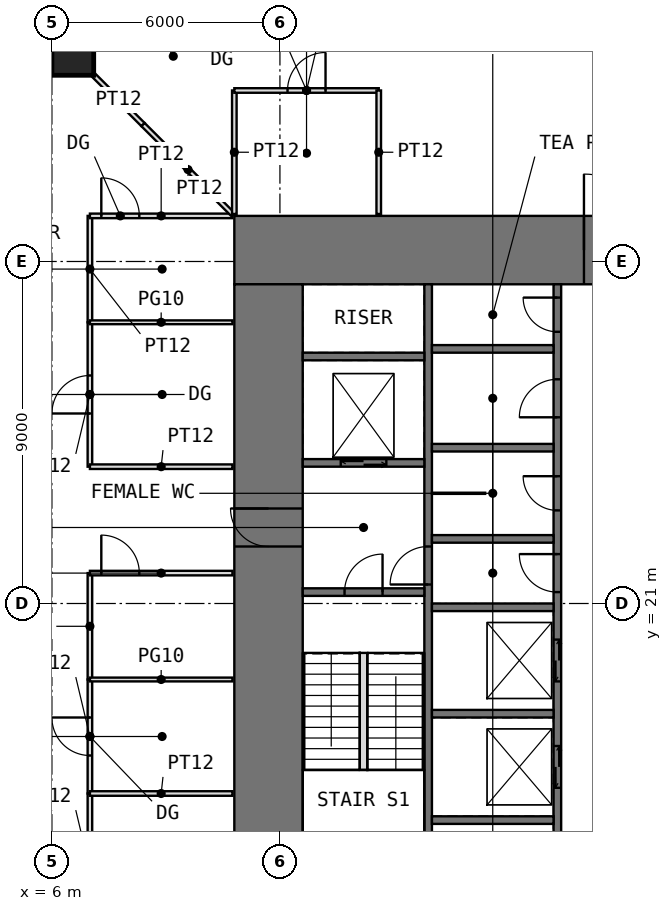
"""IFC4 building model, lengths in metres.
Left out: names, types, materials, properties, quantities, classifications, styles, units other than length and angle.
Written with IfcOpenShell. Run it as: python <this file> out.ifc"""

import sys

from ifc_helpers import new_model, si_unit, direction, frame, frame_2d, origin, origin_2d, place, context, subcontext, project, spatial, rectangle, extrude, element, fill, save


model = new_model("IFC4")
c1 = context("Model", 3, precision=1e-05, world=origin(), true_north=direction((0.0, 1.0)))
c2 = subcontext(c1, "Body", "Model", "MODEL_VIEW")
j1 = project(units=[si_unit("LENGTHUNIT", "METRE"), si_unit("PLANEANGLEUNIT", "RADIAN")], contexts=[c1])
p1 = place(None, origin())
s1 = spatial("IfcSite", under=j1, at=p1, CompositionType="ELEMENT")
p2 = place(p1, origin())
s2 = spatial("IfcBuilding", under=s1, at=p2, CompositionType="ELEMENT")
p3 = place(p2, frame((0.0, 0.0, 74.5)))
s3 = spatial("IfcBuildingStorey", under=s2, at=p3, CompositionType="ELEMENT", Elevation=74.5)
p4 = place(p3, frame((6.55, 35.45, 0.0), z_axis=(0.0, 0.0, 1.0), x_axis=(1.0, 0.0, 0.0)))
e1 = element("IfcColumn", 1, at=p4, inside=s3, PredefinedType="COLUMN", context=c2, shape_type="SweptSolid", body=[
    extrude(rectangle(XDim=1.1, YDim=1.1, at=origin_2d()), origin(), (0.0, 0.0, 1.0), 4.0),
])
p5 = place(p3, frame((10.8, 30.3, -0.05), z_axis=(0.0, 0.0, 1.0), x_axis=(1.0, 0.0, 0.0)))
e2 = element("IfcWall", 2, at=p5, inside=s3, PredefinedType="SHEAR", context=c2, shape_type="SweptSolid", body=[
    extrude(rectangle(XDim=20.4, YDim=1.8, at=frame_2d((10.2, 0.0))), origin(), (0.0, 0.0, 1.0), 4.0),
])
p6 = place(p5, frame((9.2, 0.0, 0.05)))
e3 = element("IfcOpeningElement", 3, at=p6, cuts=e2, PredefinedType="OPENING", context=c2, shape_type="SweptSolid", body=[
    extrude(rectangle(XDim=2.0, YDim=2.2, at=frame_2d((1.0, 1.1))), frame((0.0, 0.91, 0.0), z_axis=(0.0, -1.0, 0.0), x_axis=(1.0, 0.0, 0.0)), (0.0, 0.0, 1.0), 1.82),
])
p7 = place(p3, frame((11.7, 12.6, -0.05), z_axis=(0.0, 0.0, 1.0), x_axis=(0.0, 1.0, 0.0)))
e4 = element("IfcWall", 4, at=p7, inside=s3, PredefinedType="SHEAR", context=c2, shape_type="SweptSolid", body=[
    extrude(rectangle(XDim=16.8, YDim=1.8, at=frame_2d((8.4, 0.0))), origin(), (0.0, 0.0, 1.0), 4.0),
])
p8 = place(p7, frame((9.9, 0.0, 0.05)))
e5 = element("IfcOpeningElement", 5, at=p8, cuts=e4, PredefinedType="OPENING", context=c2, shape_type="SweptSolid", body=[
    extrude(rectangle(XDim=1.0, YDim=2.2, at=frame_2d((0.5, 1.1))), frame((0.0, 0.91, 0.0), z_axis=(0.0, -1.0, 0.0), x_axis=(1.0, 0.0, 0.0)), (0.0, 0.0, 1.0), 1.82),
])
p9 = place(p3, frame((15.9, 12.6, -0.05), z_axis=(0.0, 0.0, 1.0), x_axis=(0.0, 1.0, 0.0)))
e6 = element("IfcWall", 6, at=p9, inside=s3, PredefinedType="SHEAR", context=c2, shape_type="SweptSolid", body=[
    extrude(rectangle(XDim=16.8, YDim=0.2, at=frame_2d((8.4, 0.0))), origin(), (0.0, 0.0, 1.0), 4.0),
])
p10 = place(p9, frame((8.9, 0.0, 0.05)))
e7 = element("IfcOpeningElement", 7, at=p10, cuts=e6, PredefinedType="OPENING", context=c2, shape_type="SweptSolid", body=[
    extrude(rectangle(XDim=1.0, YDim=2.2, at=frame_2d((0.5, 1.1))), frame((0.0, 0.11, 0.0), z_axis=(0.0, -1.0, 0.0), x_axis=(1.0, 0.0, 0.0)), (0.0, 0.0, 1.0), 0.22),
])
p11 = place(p3, frame((19.3, 12.6, -0.05), z_axis=(0.0, 0.0, 1.0), x_axis=(0.0, 1.0, 0.0)))
e8 = element("IfcWall", 8, at=p11, inside=s3, PredefinedType="SHEAR", context=c2, shape_type="SweptSolid", body=[
    extrude(rectangle(XDim=16.8, YDim=0.2, at=frame_2d((8.4, 0.0))), origin(), (0.0, 0.0, 1.0), 4.0),
])
p12 = place(p11, frame((8.7, 0.0, 0.05)))
e9 = element("IfcOpeningElement", 9, at=p12, cuts=e8, PredefinedType="OPENING", context=c2, shape_type="SweptSolid", body=[
    extrude(rectangle(XDim=1.0, YDim=2.2, at=frame_2d((0.5, 1.1))), frame((0.0, 0.11, 0.0), z_axis=(0.0, -1.0, 0.0), x_axis=(1.0, 0.0, 0.0)), (0.0, 0.0, 1.0), 0.22),
])
p13 = place(p11, frame((10.85, 0.0, 0.05)))
e10 = element("IfcOpeningElement", 10, at=p13, cuts=e8, PredefinedType="OPENING", context=c2, shape_type="SweptSolid", body=[
    extrude(rectangle(XDim=0.9, YDim=2.2, at=frame_2d((0.45, 1.1))), frame((0.0, 0.11, 0.0), z_axis=(0.0, -1.0, 0.0), x_axis=(1.0, 0.0, 0.0)), (0.0, 0.0, 1.0), 0.22),
])
p14 = place(p11, frame((13.3, 0.0, 0.05)))
e11 = element("IfcOpeningElement", 11, at=p14, cuts=e8, PredefinedType="OPENING", context=c2, shape_type="SweptSolid", body=[
    extrude(rectangle(XDim=1.0, YDim=2.2, at=frame_2d((0.5, 1.1))), frame((0.0, 0.11, 0.0), z_axis=(0.0, -1.0, 0.0), x_axis=(1.0, 0.0, 0.0)), (0.0, 0.0, 1.0), 0.22),
])
p15 = place(p11, frame((15.55, 0.0, 0.05)))
e12 = element("IfcOpeningElement", 12, at=p15, cuts=e8, PredefinedType="OPENING", context=c2, shape_type="SweptSolid", body=[
    extrude(rectangle(XDim=0.9, YDim=2.2, at=frame_2d((0.45, 1.1))), frame((0.0, 0.11, 0.0), z_axis=(0.0, -1.0, 0.0), x_axis=(1.0, 0.0, 0.0)), (0.0, 0.0, 1.0), 0.22),
])
p16 = place(p11, frame((0.75, 0.0, 0.05)))
e13 = element("IfcOpeningElement", 13, at=p16, cuts=e8, PredefinedType="OPENING", context=c2, shape_type="SweptSolid", body=[
    extrude(rectangle(XDim=1.1, YDim=2.2, at=frame_2d((0.55, 1.1))), frame((0.0, 0.11, 0.0), z_axis=(0.0, -1.0, 0.0), x_axis=(1.0, 0.0, 0.0)), (0.0, 0.0, 1.0), 0.22),
])
p17 = place(p11, frame((3.55, 0.0, 0.05)))
e14 = element("IfcOpeningElement", 14, at=p17, cuts=e8, PredefinedType="OPENING", context=c2, shape_type="SweptSolid", body=[
    extrude(rectangle(XDim=1.1, YDim=2.2, at=frame_2d((0.55, 1.1))), frame((0.0, 0.11, 0.0), z_axis=(0.0, -1.0, 0.0), x_axis=(1.0, 0.0, 0.0)), (0.0, 0.0, 1.0), 0.22),
])
p18 = place(p11, frame((6.35, 0.0, 0.05)))
e15 = element("IfcOpeningElement", 15, at=p18, cuts=e8, PredefinedType="OPENING", context=c2, shape_type="SweptSolid", body=[
    extrude(rectangle(XDim=1.1, YDim=2.2, at=frame_2d((0.55, 1.1))), frame((0.0, 0.11, 0.0), z_axis=(0.0, -1.0, 0.0), x_axis=(1.0, 0.0, 0.0)), (0.0, 0.0, 1.0), 0.22),
])
p19 = place(p3, frame((12.6, 21.3, -0.05), z_axis=(0.0, 0.0, 1.0), x_axis=(1.0, 0.0, 0.0)))
e16 = element("IfcWall", 16, at=p19, inside=s3, PredefinedType="SHEAR", context=c2, shape_type="SweptSolid", body=[
    extrude(rectangle(XDim=3.2, YDim=0.2, at=frame_2d((1.6, 0.0))), origin(), (0.0, 0.0, 1.0), 4.0),
])
p20 = place(p19, frame((1.1, 0.0, 0.05)))
e17 = element("IfcOpeningElement", 17, at=p20, cuts=e16, PredefinedType="OPENING", context=c2, shape_type="SweptSolid", body=[
    extrude(rectangle(XDim=1.0, YDim=2.2, at=frame_2d((0.5, 1.1))), frame((0.0, 0.11, 0.0), z_axis=(0.0, -1.0, 0.0), x_axis=(1.0, 0.0, 0.0)), (0.0, 0.0, 1.0), 0.22),
])
p21 = place(p3, frame((12.6, 24.7, -0.05), z_axis=(0.0, 0.0, 1.0), x_axis=(1.0, 0.0, 0.0)))
e18 = element("IfcWall", 18, at=p21, inside=s3, PredefinedType="SHEAR", context=c2, shape_type="SweptSolid", body=[
    extrude(rectangle(XDim=3.2, YDim=0.2, at=frame_2d((1.6, 0.0))), origin(), (0.0, 0.0, 1.0), 4.0),
])
p22 = place(p21, frame((1.0, 0.0, 0.05)))
e19 = element("IfcOpeningElement", 19, at=p22, cuts=e18, PredefinedType="OPENING", context=c2, shape_type="SweptSolid", body=[
    extrude(rectangle(XDim=1.2, YDim=2.2, at=frame_2d((0.6, 1.1))), frame((0.0, 0.11, 0.0), z_axis=(0.0, -1.0, 0.0), x_axis=(1.0, 0.0, 0.0)), (0.0, 0.0, 1.0), 0.22),
])
for number, where, z_axis, x_axis in (
    (20, (12.6, 27.5, -0.05), (0.0, 0.0, 1.0), (1.0, 0.0, 0.0)),
    (21, (16.0, 15.3, -0.05), (0.0, 0.0, 1.0), (1.0, 0.0, 0.0)),
    (22, (16.0, 18.1, -0.05), (0.0, 0.0, 1.0), (1.0, 0.0, 0.0)),
    (23, (16.0, 20.9, -0.05), (0.0, 0.0, 1.0), (1.0, 0.0, 0.0)),
    (24, (16.0, 22.7, -0.05), (0.0, 0.0, 1.0), (1.0, 0.0, 0.0)),
    (25, (16.0, 25.1, -0.05), (0.0, 0.0, 1.0), (1.0, 0.0, 0.0)),
    (26, (16.0, 27.7, -0.05), (0.0, 0.0, 1.0), (1.0, 0.0, 0.0)),
):
    element("IfcWall", number, at=place(p3, frame(where, z_axis=z_axis, x_axis=x_axis)), inside=s3, PredefinedType="SHEAR", context=c2, shape_type="SweptSolid", body=[
        extrude(rectangle(XDim=3.2, YDim=0.2, at=frame_2d((1.6, 0.0))), origin(), (0.0, 0.0, 1.0), 4.0),
    ])
p23 = place(p3, frame((16.0, 23.9, 0.0), z_axis=(0.0, 0.0, 1.0), x_axis=(1.0, 0.0, 0.0)))
e27 = element("IfcWall", 27, at=p23, inside=s3, PredefinedType="PARTITIONING", context=c2, shape_type="SweptSolid", body=[
    extrude(rectangle(XDim=1.4, YDim=0.03, at=frame_2d((0.7, 0.0))), origin(), (0.0, 0.0, 1.0), 3.75),
])
p24 = place(p3, frame((7.0, 12.0, 0.0), z_axis=(0.0, 0.0, 1.0), x_axis=(0.0, 1.0, 0.0)))
e28 = element("IfcWall", 28, at=p24, inside=s3, PredefinedType="PARTITIONING", context=c2, shape_type="SweptSolid", body=[
    extrude(rectangle(XDim=4.0, YDim=0.12, at=frame_2d((2.0, 0.0))), origin(), (0.0, 0.0, 1.0), 3.75),
])
p25 = place(p24, frame((1.5, 0.0, 0.0)))
e29 = element("IfcOpeningElement", 29, at=p25, cuts=e28, PredefinedType="OPENING", context=c2, shape_type="SweptSolid", body=[
    extrude(rectangle(XDim=1.0, YDim=2.4, at=frame_2d((0.5, 1.2))), frame((0.0, 0.07, 0.0), z_axis=(0.0, -1.0, 0.0), x_axis=(1.0, 0.0, 0.0)), (0.0, 0.0, 1.0), 0.14),
])
p26 = place(p3, frame((7.0, 16.0, 0.0), z_axis=(0.0, 0.0, 1.0), x_axis=(0.0, 1.0, 0.0)))
e30 = element("IfcWall", 30, at=p26, inside=s3, PredefinedType="PARTITIONING", context=c2, shape_type="SweptSolid", body=[
    extrude(rectangle(XDim=3.0, YDim=0.12, at=frame_2d((1.5, 0.0))), origin(), (0.0, 0.0, 1.0), 3.75),
])
p27 = place(p26, frame((1.0, 0.0, 0.0)))
e31 = element("IfcOpeningElement", 31, at=p27, cuts=e30, PredefinedType="OPENING", context=c2, shape_type="SweptSolid", body=[
    extrude(rectangle(XDim=1.0, YDim=2.4, at=frame_2d((0.5, 1.2))), frame((0.0, 0.07, 0.0), z_axis=(0.0, -1.0, 0.0), x_axis=(1.0, 0.0, 0.0)), (0.0, 0.0, 1.0), 0.14),
])
p28 = place(p3, frame((7.0, 16.0, 0.0), z_axis=(0.0, 0.0, 1.0), x_axis=(1.0, 0.0, 0.0)))
e32 = element("IfcWall", 32, at=p28, inside=s3, PredefinedType="PARTITIONING", context=c2, shape_type="SweptSolid", body=[
    extrude(rectangle(XDim=3.75, YDim=0.12, at=frame_2d((1.875, 0.0))), origin(), (0.0, 0.0, 1.0), 3.75),
])
p29 = place(p3, frame((7.0, 19.0, 0.0), z_axis=(0.0, 0.0, 1.0), x_axis=(0.0, 1.0, 0.0)))
e33 = element("IfcWall", 33, at=p29, inside=s3, PredefinedType="PARTITIONING", context=c2, shape_type="SweptSolid", body=[
    extrude(rectangle(XDim=2.8, YDim=0.12, at=frame_2d((1.4, 0.0))), origin(), (0.0, 0.0, 1.0), 3.75),
])
p30 = place(p3, frame((7.0, 19.0, 0.0), z_axis=(0.0, 0.0, 1.0), x_axis=(1.0, 0.0, 0.0)))
e34 = element("IfcWall", 34, at=p30, inside=s3, PredefinedType="PARTITIONING", context=c2, shape_type="SweptSolid", body=[
    extrude(rectangle(XDim=3.75, YDim=0.1, at=frame_2d((1.875, 0.0))), origin(), (0.0, 0.0, 1.0), 3.75),
])
p31 = place(p3, frame((7.0, 21.8, 0.0), z_axis=(0.0, 0.0, 1.0), x_axis=(1.0, 0.0, 0.0)))
e35 = element("IfcWall", 35, at=p31, inside=s3, PredefinedType="PARTITIONING", context=c2, shape_type="SweptSolid", body=[
    extrude(rectangle(XDim=3.75, YDim=0.12, at=frame_2d((1.875, 0.0))), origin(), (0.0, 0.0, 1.0), 3.75),
])
p32 = place(p31, frame((0.3, 0.0, 0.0)))
e36 = element("IfcOpeningElement", 36, at=p32, cuts=e35, PredefinedType="OPENING", context=c2, shape_type="SweptSolid", body=[
    extrude(rectangle(XDim=1.0, YDim=2.4, at=frame_2d((0.5, 1.2))), frame((0.0, 0.07, 0.0), z_axis=(0.0, -1.0, 0.0), x_axis=(1.0, 0.0, 0.0)), (0.0, 0.0, 1.0), 0.14),
])
p33 = place(p3, frame((7.0, 24.6, 0.0), z_axis=(0.0, 0.0, 1.0), x_axis=(0.0, 1.0, 0.0)))
e37 = element("IfcWall", 37, at=p33, inside=s3, PredefinedType="PARTITIONING", context=c2, shape_type="SweptSolid", body=[
    extrude(rectangle(XDim=3.8, YDim=0.12, at=frame_2d((1.9, 0.0))), origin(), (0.0, 0.0, 1.0), 3.75),
])
p34 = place(p33, frame((1.4, 0.0, 0.0)))
e38 = element("IfcOpeningElement", 38, at=p34, cuts=e37, PredefinedType="OPENING", context=c2, shape_type="SweptSolid", body=[
    extrude(rectangle(XDim=1.0, YDim=2.4, at=frame_2d((0.5, 1.2))), frame((0.0, 0.07, 0.0), z_axis=(0.0, -1.0, 0.0), x_axis=(1.0, 0.0, 0.0)), (0.0, 0.0, 1.0), 0.14),
])
p35 = place(p3, frame((7.0, 24.6, 0.0), z_axis=(0.0, 0.0, 1.0), x_axis=(1.0, 0.0, 0.0)))
e39 = element("IfcWall", 39, at=p35, inside=s3, PredefinedType="PARTITIONING", context=c2, shape_type="SweptSolid", body=[
    extrude(rectangle(XDim=3.75, YDim=0.12, at=frame_2d((1.875, 0.0))), origin(), (0.0, 0.0, 1.0), 3.75),
])
p36 = place(p3, frame((7.0, 28.4, 0.0), z_axis=(0.0, 0.0, 1.0), x_axis=(0.0, 1.0, 0.0)))
e40 = element("IfcWall", 40, at=p36, inside=s3, PredefinedType="PARTITIONING", context=c2, shape_type="SweptSolid", body=[
    extrude(rectangle(XDim=2.8, YDim=0.12, at=frame_2d((1.4, 0.0))), origin(), (0.0, 0.0, 1.0), 3.75),
])
p37 = place(p3, frame((7.0, 28.4, 0.0), z_axis=(0.0, 0.0, 1.0), x_axis=(1.0, 0.0, 0.0)))
e41 = element("IfcWall", 41, at=p37, inside=s3, PredefinedType="PARTITIONING", context=c2, shape_type="SweptSolid", body=[
    extrude(rectangle(XDim=3.75, YDim=0.1, at=frame_2d((1.875, 0.0))), origin(), (0.0, 0.0, 1.0), 3.75),
])
p38 = place(p3, frame((7.0, 31.2, 0.0), z_axis=(0.0, 0.0, 1.0), x_axis=(1.0, 0.0, 0.0)))
e42 = element("IfcWall", 42, at=p38, inside=s3, PredefinedType="PARTITIONING", context=c2, shape_type="SweptSolid", body=[
    extrude(rectangle(XDim=3.75, YDim=0.12, at=frame_2d((1.875, 0.0))), origin(), (0.0, 0.0, 1.0), 3.75),
])
p39 = place(p38, frame((0.3, 0.0, 0.0)))
e43 = element("IfcOpeningElement", 43, at=p39, cuts=e42, PredefinedType="OPENING", context=c2, shape_type="SweptSolid", body=[
    extrude(rectangle(XDim=1.0, YDim=2.4, at=frame_2d((0.5, 1.2))), frame((0.0, 0.07, 0.0), z_axis=(0.0, -1.0, 0.0), x_axis=(1.0, 0.0, 0.0)), (0.0, 0.0, 1.0), 0.14),
])
p40 = place(p3, frame((7.11, 34.89, 0.0), z_axis=(0.0, 0.0, 1.0), x_axis=(0.707106781187, -0.707106781187, 0.0)))
e44 = element("IfcWall", 44, at=p40, inside=s3, PredefinedType="PARTITIONING", context=c2, shape_type="SweptSolid", body=[
    extrude(rectangle(XDim=1.822, YDim=0.12, at=frame_2d((0.911, 0.0))), origin(), (0.0, 0.0, 1.0), 3.75),
])
p41 = place(p3, frame((8.398, 33.602, 0.0), z_axis=(0.0, 0.0, 1.0), x_axis=(0.707106781187, -0.707106781187, 0.0)))
e45 = element("IfcWall", 45, at=p41, inside=s3, PredefinedType="PARTITIONING", context=c2, shape_type="SweptSolid", body=[
    extrude(rectangle(XDim=3.346, YDim=0.12, at=frame_2d((1.673, 0.0))), origin(), (0.0, 0.0, 1.0), 3.75),
])
p42 = place(p3, frame((10.8, 31.25, 0.0), z_axis=(0.0, 0.0, 1.0), x_axis=(0.0, 1.0, 0.0)))
e46 = element("IfcWall", 46, at=p42, inside=s3, PredefinedType="PARTITIONING", context=c2, shape_type="SweptSolid", body=[
    extrude(rectangle(XDim=3.25, YDim=0.12, at=frame_2d((1.625, 0.0))), origin(), (0.0, 0.0, 1.0), 3.75),
])
p43 = place(p3, frame((10.8, 34.5, 0.0), z_axis=(0.0, 0.0, 1.0), x_axis=(1.0, 0.0, 0.0)))
e47 = element("IfcWall", 47, at=p43, inside=s3, PredefinedType="PARTITIONING", context=c2, shape_type="SweptSolid", body=[
    extrude(rectangle(XDim=3.8, YDim=0.12, at=frame_2d((1.9, 0.0))), origin(), (0.0, 0.0, 1.0), 3.75),
])
p44 = place(p43, frame((1.4, 0.0, 0.0)))
e48 = element("IfcOpeningElement", 48, at=p44, cuts=e47, PredefinedType="OPENING", context=c2, shape_type="SweptSolid", body=[
    extrude(rectangle(XDim=1.0, YDim=2.2, at=frame_2d((0.5, 1.1))), frame((0.0, 0.07, 0.0), z_axis=(0.0, -1.0, 0.0), x_axis=(1.0, 0.0, 0.0)), (0.0, 0.0, 1.0), 0.14),
])
p45 = place(p3, frame((14.6, 31.25, 0.0), z_axis=(0.0, 0.0, 1.0), x_axis=(0.0, 1.0, 0.0)))
e49 = element("IfcWall", 49, at=p45, inside=s3, PredefinedType="PARTITIONING", context=c2, shape_type="SweptSolid", body=[
    extrude(rectangle(XDim=3.25, YDim=0.12, at=frame_2d((1.625, 0.0))), origin(), (0.0, 0.0, 1.0), 3.75),
])
p46 = place(p3, frame((14.2, 16.62, 0.0), z_axis=(0.0, 0.0, 1.0), x_axis=(0.0, 1.0, 0.0)))
e50 = element("IfcWall", 50, at=p46, inside=s3, PredefinedType="PARTITIONING", context=c2, shape_type="SweptSolid", body=[
    extrude(rectangle(XDim=3.08, YDim=0.2, at=frame_2d((1.54, 0.0))), origin(), (0.0, 0.0, 1.0), 4.0),
])
p47 = place(p6, origin())
e51 = element("IfcDoor", 51, at=p47, inside=s3, OperationType="DOUBLE_DOOR_SINGLE_SWING", PredefinedType="DOOR", context=c2, shape_type="SweptSolid", body=[
    extrude(rectangle(XDim=2.0, YDim=2.2, at=frame_2d((1.0, 1.1))), frame((0.0, 0.025, 0.0), z_axis=(0.0, -1.0, 0.0), x_axis=(1.0, 0.0, 0.0)), (0.0, 0.0, 1.0), 0.05),
])
fill(e3, e51)
p48 = place(p8, origin())
e52 = element("IfcDoor", 52, at=p48, inside=s3, OperationType="SINGLE_SWING_RIGHT", PredefinedType="DOOR", context=c2, shape_type="SweptSolid", body=[
    extrude(rectangle(XDim=1.0, YDim=2.2, at=frame_2d((0.5, 1.1))), frame((0.0, 0.025, 0.0), z_axis=(0.0, -1.0, 0.0), x_axis=(1.0, 0.0, 0.0)), (0.0, 0.0, 1.0), 0.05),
])
fill(e5, e52)
p49 = place(p20, origin())
e53 = element("IfcDoor", 53, at=p49, inside=s3, OperationType="SINGLE_SWING_RIGHT", PredefinedType="DOOR", context=c2, shape_type="SweptSolid", body=[
    extrude(rectangle(XDim=1.0, YDim=2.2, at=frame_2d((0.5, 1.1))), frame((0.0, 0.025, 0.0), z_axis=(0.0, -1.0, 0.0), x_axis=(1.0, 0.0, 0.0)), (0.0, 0.0, 1.0), 0.05),
])
fill(e17, e53)
p50 = place(p10, origin())
e54 = element("IfcDoor", 54, at=p50, inside=s3, OperationType="SINGLE_SWING_LEFT", PredefinedType="DOOR", context=c2, shape_type="SweptSolid", body=[
    extrude(rectangle(XDim=1.0, YDim=2.2, at=frame_2d((0.5, 1.1))), frame((0.0, 0.025, 0.0), z_axis=(0.0, -1.0, 0.0), x_axis=(1.0, 0.0, 0.0)), (0.0, 0.0, 1.0), 0.05),
])
fill(e7, e54)
p51 = place(p12, origin())
e55 = element("IfcDoor", 55, at=p51, inside=s3, OperationType="SINGLE_SWING_RIGHT", PredefinedType="DOOR", context=c2, shape_type="SweptSolid", body=[
    extrude(rectangle(XDim=1.0, YDim=2.2, at=frame_2d((0.5, 1.1))), frame((0.0, 0.025, 0.0), z_axis=(0.0, -1.0, 0.0), x_axis=(1.0, 0.0, 0.0)), (0.0, 0.0, 1.0), 0.05),
])
fill(e9, e55)
p52 = place(p13, origin())
e56 = element("IfcDoor", 56, at=p52, inside=s3, OperationType="SINGLE_SWING_RIGHT", PredefinedType="DOOR", context=c2, shape_type="SweptSolid", body=[
    extrude(rectangle(XDim=0.9, YDim=2.2, at=frame_2d((0.45, 1.1))), frame((0.0, 0.025, 0.0), z_axis=(0.0, -1.0, 0.0), x_axis=(1.0, 0.0, 0.0)), (0.0, 0.0, 1.0), 0.05),
])
fill(e10, e56)
p53 = place(p14, origin())
e57 = element("IfcDoor", 57, at=p53, inside=s3, OperationType="SINGLE_SWING_LEFT", PredefinedType="DOOR", context=c2, shape_type="SweptSolid", body=[
    extrude(rectangle(XDim=1.0, YDim=2.2, at=frame_2d((0.5, 1.1))), frame((0.0, 0.025, 0.0), z_axis=(0.0, -1.0, 0.0), x_axis=(1.0, 0.0, 0.0)), (0.0, 0.0, 1.0), 0.05),
])
fill(e11, e57)
p54 = place(p15, origin())
e58 = element("IfcDoor", 58, at=p54, inside=s3, OperationType="SINGLE_SWING_RIGHT", PredefinedType="DOOR", context=c2, shape_type="SweptSolid", body=[
    extrude(rectangle(XDim=0.9, YDim=2.2, at=frame_2d((0.45, 1.1))), frame((0.0, 0.025, 0.0), z_axis=(0.0, -1.0, 0.0), x_axis=(1.0, 0.0, 0.0)), (0.0, 0.0, 1.0), 0.05),
])
fill(e12, e58)
p55 = place(p44, origin())
e59 = element("IfcDoor", 59, at=p55, inside=s3, OperationType="SINGLE_SWING_RIGHT", PredefinedType="DOOR", context=c2, shape_type="SweptSolid", body=[
    extrude(rectangle(XDim=1.0, YDim=2.2, at=frame_2d((0.5, 1.1))), frame((0.0, 0.025, 0.0), z_axis=(0.0, -1.0, 0.0), x_axis=(1.0, 0.0, 0.0)), (0.0, 0.0, 1.0), 0.05),
])
fill(e48, e59)
p56 = place(p27, origin())
e60 = element("IfcDoor", 60, at=p56, inside=s3, OperationType="SINGLE_SWING_RIGHT", PredefinedType="DOOR", context=c2, shape_type="SweptSolid", body=[
    extrude(rectangle(XDim=1.0, YDim=2.4, at=frame_2d((0.5, 1.2))), frame((0.0, 0.025, 0.0), z_axis=(0.0, -1.0, 0.0), x_axis=(1.0, 0.0, 0.0)), (0.0, 0.0, 1.0), 0.05),
])
fill(e31, e60)
p57 = place(p34, origin())
e61 = element("IfcDoor", 61, at=p57, inside=s3, OperationType="SINGLE_SWING_LEFT", PredefinedType="DOOR", context=c2, shape_type="SweptSolid", body=[
    extrude(rectangle(XDim=1.0, YDim=2.4, at=frame_2d((0.5, 1.2))), frame((0.0, 0.025, 0.0), z_axis=(0.0, -1.0, 0.0), x_axis=(1.0, 0.0, 0.0)), (0.0, 0.0, 1.0), 0.05),
])
fill(e38, e61)
p58 = place(p39, origin())
e62 = element("IfcDoor", 62, at=p58, inside=s3, OperationType="SINGLE_SWING_LEFT", PredefinedType="DOOR", context=c2, shape_type="SweptSolid", body=[
    extrude(rectangle(XDim=1.0, YDim=2.4, at=frame_2d((0.5, 1.2))), frame((0.0, 0.025, 0.0), z_axis=(0.0, -1.0, 0.0), x_axis=(1.0, 0.0, 0.0)), (0.0, 0.0, 1.0), 0.05),
])
fill(e43, e62)
p59 = place(p32, origin())
e63 = element("IfcDoor", 63, at=p59, inside=s3, OperationType="SINGLE_SWING_LEFT", PredefinedType="DOOR", context=c2, shape_type="SweptSolid", body=[
    extrude(rectangle(XDim=1.0, YDim=2.4, at=frame_2d((0.5, 1.2))), frame((0.0, 0.025, 0.0), z_axis=(0.0, -1.0, 0.0), x_axis=(1.0, 0.0, 0.0)), (0.0, 0.0, 1.0), 0.05),
])
fill(e36, e63)
p60 = place(p17, origin())
e64 = element("IfcDoor", 64, at=p60, inside=s3, OperationType="DOUBLE_DOOR_SLIDING", PredefinedType="DOOR", context=c2, shape_type="SweptSolid", body=[
    extrude(rectangle(XDim=1.1, YDim=2.2, at=frame_2d((0.55, 1.1))), frame((0.0, 0.025, 0.0), z_axis=(0.0, -1.0, 0.0), x_axis=(1.0, 0.0, 0.0)), (0.0, 0.0, 1.0), 0.05),
])
fill(e14, e64)
p61 = place(p18, origin())
e65 = element("IfcDoor", 65, at=p61, inside=s3, OperationType="DOUBLE_DOOR_SLIDING", PredefinedType="DOOR", context=c2, shape_type="SweptSolid", body=[
    extrude(rectangle(XDim=1.1, YDim=2.2, at=frame_2d((0.55, 1.1))), frame((0.0, 0.025, 0.0), z_axis=(0.0, -1.0, 0.0), x_axis=(1.0, 0.0, 0.0)), (0.0, 0.0, 1.0), 0.05),
])
fill(e15, e65)
p62 = place(p22, origin())
e66 = element("IfcDoor", 66, at=p62, inside=s3, OperationType="DOUBLE_DOOR_SLIDING", PredefinedType="DOOR", context=c2, shape_type="SweptSolid", body=[
    extrude(rectangle(XDim=1.2, YDim=2.2, at=frame_2d((0.6, 1.1))), frame((0.0, 0.025, 0.0), z_axis=(0.0, -1.0, 0.0), x_axis=(1.0, 0.0, 0.0)), (0.0, 0.0, 1.0), 0.05),
])
fill(e19, e66)
save(model, sys.argv[1])
